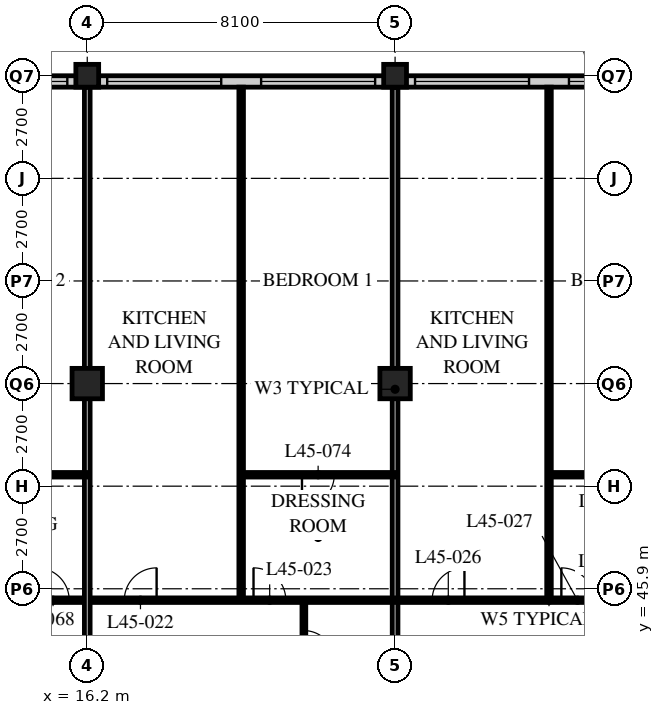
"""IFC4 building model, lengths in metres.
Left out: names, types, materials, properties, quantities, classifications, styles, units other than length and angle.
Written with IfcOpenShell. Run it as: python <this file> out.ifc"""

import sys

from ifc_helpers import new_model, si_unit, direction, frame, frame_2d, origin, origin_2d, place, context, subcontext, project, spatial, rectangle, hollow_rectangle, extrude, element, fill, save


model = new_model("IFC4")
c1 = context("Model", 3, precision=1e-05, world=origin(), true_north=direction((0.0, 1.0)))
c2 = subcontext(c1, "Body", "Model", "MODEL_VIEW")
j1 = project(units=[si_unit("LENGTHUNIT", "METRE"), si_unit("PLANEANGLEUNIT", "RADIAN")], contexts=[c1])
p1 = place(None, origin())
s1 = spatial("IfcSite", under=j1, at=p1, CompositionType="ELEMENT")
p2 = place(p1, origin())
s2 = spatial("IfcBuilding", under=s1, at=p2, CompositionType="ELEMENT")
p3 = place(p2, frame((0.0, 0.0, 177.6)))
s3 = spatial("IfcBuildingStorey", under=s2, at=p3, CompositionType="ELEMENT", Elevation=177.6)
p4 = place(p3, frame((16.2, 51.3, 0.0), z_axis=(0.0, 0.0, 1.0), x_axis=(1.0, 0.0, 0.0)))
e1 = element("IfcColumn", 1, at=p4, inside=s3, PredefinedType="COLUMN", context=c2, shape_type="SweptSolid", body=[
    extrude(hollow_rectangle(XDim=0.8, YDim=0.8, WallThickness=0.08, at=origin_2d()), origin(), (0.0, 0.0, 1.0), 3.6),
])
p5 = place(p3, frame((16.2, 59.4, 0.0), z_axis=(0.0, 0.0, 1.0), x_axis=(1.0, 0.0, 0.0)))
e2 = element("IfcColumn", 2, at=p5, inside=s3, PredefinedType="COLUMN", context=c2, shape_type="SweptSolid", body=[
    extrude(hollow_rectangle(XDim=0.6, YDim=0.6, WallThickness=0.05, at=origin_2d()), origin(), (0.0, 0.0, 1.0), 3.6),
])
p6 = place(p3, frame((24.3, 51.3, 0.0), z_axis=(0.0, 0.0, 1.0), x_axis=(1.0, 0.0, 0.0)))
e3 = element("IfcColumn", 3, at=p6, inside=s3, PredefinedType="COLUMN", context=c2, shape_type="SweptSolid", body=[
    extrude(hollow_rectangle(XDim=0.8, YDim=0.8, WallThickness=0.08, at=origin_2d()), origin(), (0.0, 0.0, 1.0), 3.6),
])
p7 = place(p3, frame((24.3, 59.4, 0.0), z_axis=(0.0, 0.0, 1.0), x_axis=(1.0, 0.0, 0.0)))
e4 = element("IfcColumn", 4, at=p7, inside=s3, PredefinedType="COLUMN", context=c2, shape_type="SweptSolid", body=[
    extrude(hollow_rectangle(XDim=0.6, YDim=0.6, WallThickness=0.05, at=origin_2d()), origin(), (0.0, 0.0, 1.0), 3.6),
])
p8 = place(p3, frame((48.3, 59.25, 0.0), z_axis=(0.0, 0.0, 1.0), x_axis=(-1.0, 0.0, 0.0)))
e5 = element("IfcWall", 5, at=p8, inside=s3, PredefinedType="SOLIDWALL", context=c2, shape_type="SweptSolid", body=[
    extrude(rectangle(XDim=40.2, YDim=0.3, at=frame_2d((20.1, 0.0))), origin(), (0.0, 0.0, 1.0), 3.39),
])
p9 = place(p8, frame((0.225, 0.0, 0.6)))
e6 = element("IfcOpeningElement", 6, at=p9, cuts=e5, PredefinedType="OPENING", context=c2, shape_type="SweptSolid", body=[
    extrude(rectangle(XDim=3.0, YDim=2.4, at=frame_2d((1.5, 1.2))), frame((0.0, 0.16, 0.0), z_axis=(0.0, -1.0, 0.0), x_axis=(1.0, 0.0, 0.0)), (0.0, 0.0, 1.0), 0.32),
])
p10 = place(p8, frame((4.275, 0.0, 0.6)))
e7 = element("IfcOpeningElement", 7, at=p10, cuts=e5, PredefinedType="OPENING", context=c2, shape_type="SweptSolid", body=[
    extrude(rectangle(XDim=3.0, YDim=2.4, at=frame_2d((1.5, 1.2))), frame((0.0, 0.16, 0.0), z_axis=(0.0, -1.0, 0.0), x_axis=(1.0, 0.0, 0.0)), (0.0, 0.0, 1.0), 0.32),
])
p11 = place(p8, frame((8.325, 0.0, 0.6)))
e8 = element("IfcOpeningElement", 8, at=p11, cuts=e5, PredefinedType="OPENING", context=c2, shape_type="SweptSolid", body=[
    extrude(rectangle(XDim=3.0, YDim=2.4, at=frame_2d((1.5, 1.2))), frame((0.0, 0.16, 0.0), z_axis=(0.0, -1.0, 0.0), x_axis=(1.0, 0.0, 0.0)), (0.0, 0.0, 1.0), 0.32),
])
p12 = place(p8, frame((12.375, 0.0, 0.6)))
e9 = element("IfcOpeningElement", 9, at=p12, cuts=e5, PredefinedType="OPENING", context=c2, shape_type="SweptSolid", body=[
    extrude(rectangle(XDim=3.0, YDim=2.4, at=frame_2d((1.5, 1.2))), frame((0.0, 0.16, 0.0), z_axis=(0.0, -1.0, 0.0), x_axis=(1.0, 0.0, 0.0)), (0.0, 0.0, 1.0), 0.32),
])
p13 = place(p8, frame((16.425, 0.0, 0.6)))
e10 = element("IfcOpeningElement", 10, at=p13, cuts=e5, PredefinedType="OPENING", context=c2, shape_type="SweptSolid", body=[
    extrude(rectangle(XDim=3.0, YDim=2.4, at=frame_2d((1.5, 1.2))), frame((0.0, 0.16, 0.0), z_axis=(0.0, -1.0, 0.0), x_axis=(1.0, 0.0, 0.0)), (0.0, 0.0, 1.0), 0.32),
])
p14 = place(p8, frame((20.475, 0.0, 0.6)))
e11 = element("IfcOpeningElement", 11, at=p14, cuts=e5, PredefinedType="OPENING", context=c2, shape_type="SweptSolid", body=[
    extrude(rectangle(XDim=3.0, YDim=2.4, at=frame_2d((1.5, 1.2))), frame((0.0, 0.16, 0.0), z_axis=(0.0, -1.0, 0.0), x_axis=(1.0, 0.0, 0.0)), (0.0, 0.0, 1.0), 0.32),
])
p15 = place(p8, frame((24.525, 0.0, 0.6)))
e12 = element("IfcOpeningElement", 12, at=p15, cuts=e5, PredefinedType="OPENING", context=c2, shape_type="SweptSolid", body=[
    extrude(rectangle(XDim=3.0, YDim=2.4, at=frame_2d((1.5, 1.2))), frame((0.0, 0.16, 0.0), z_axis=(0.0, -1.0, 0.0), x_axis=(1.0, 0.0, 0.0)), (0.0, 0.0, 1.0), 0.32),
])
p16 = place(p8, frame((28.575, 0.0, 0.6)))
e13 = element("IfcOpeningElement", 13, at=p16, cuts=e5, PredefinedType="OPENING", context=c2, shape_type="SweptSolid", body=[
    extrude(rectangle(XDim=3.0, YDim=2.4, at=frame_2d((1.5, 1.2))), frame((0.0, 0.16, 0.0), z_axis=(0.0, -1.0, 0.0), x_axis=(1.0, 0.0, 0.0)), (0.0, 0.0, 1.0), 0.32),
])
p17 = place(p8, frame((32.625, 0.0, 0.6)))
e14 = element("IfcOpeningElement", 14, at=p17, cuts=e5, PredefinedType="OPENING", context=c2, shape_type="SweptSolid", body=[
    extrude(rectangle(XDim=3.0, YDim=2.4, at=frame_2d((1.5, 1.2))), frame((0.0, 0.16, 0.0), z_axis=(0.0, -1.0, 0.0), x_axis=(1.0, 0.0, 0.0)), (0.0, 0.0, 1.0), 0.32),
])
p18 = place(p8, frame((36.675, 0.0, 0.6)))
e15 = element("IfcOpeningElement", 15, at=p18, cuts=e5, PredefinedType="OPENING", context=c2, shape_type="SweptSolid", body=[
    extrude(rectangle(XDim=3.0, YDim=2.4, at=frame_2d((1.5, 1.2))), frame((0.0, 0.16, 0.0), z_axis=(0.0, -1.0, 0.0), x_axis=(1.0, 0.0, 0.0)), (0.0, 0.0, 1.0), 0.32),
])
p19 = place(p3, frame((21.9, 43.2, 0.0), z_axis=(0.0, 0.0, 1.0), x_axis=(0.0, 1.0, 0.0)))
e16 = element("IfcWall", 16, at=p19, inside=s3, PredefinedType="PARTITIONING", context=c2, shape_type="SweptSolid", body=[
    extrude(rectangle(XDim=2.4, YDim=0.1, at=frame_2d((1.2, 0.0))), origin(), (0.0, 0.0, 1.0), 3.39),
])
p20 = place(p19, frame((0.8, 0.0, 0.0)))
e17 = element("IfcOpeningElement", 17, at=p20, cuts=e16, PredefinedType="OPENING", context=c2, shape_type="SweptSolid", body=[
    extrude(rectangle(XDim=0.8, YDim=2.1, at=frame_2d((0.4, 1.05))), frame((0.0, 0.06, 0.0), z_axis=(0.0, -1.0, 0.0), x_axis=(1.0, 0.0, 0.0)), (0.0, 0.0, 1.0), 0.12),
])
p21 = place(p3, frame((20.25, 45.6, 0.0), z_axis=(0.0, 0.0, 1.0), x_axis=(0.0, 1.0, 0.0)))
e18 = element("IfcWall", 18, at=p21, inside=s3, PredefinedType="PARTITIONING", context=c2, shape_type="SweptSolid", body=[
    extrude(rectangle(XDim=13.5, YDim=0.12, at=frame_2d((6.75, 0.0))), origin(), (0.0, 0.0, 1.0), 3.39),
])
p22 = place(p3, frame((24.3, 43.2, 0.0), z_axis=(0.0, 0.0, 1.0), x_axis=(0.0, 1.0, 0.0)))
e19 = element("IfcWall", 19, at=p22, inside=s3, PredefinedType="PARTITIONING", context=c2, shape_type="SweptSolid", body=[
    extrude(rectangle(XDim=15.9, YDim=0.15, at=frame_2d((7.95, 0.0))), origin(), (0.0, 0.0, 1.0), 2.778),
])
p23 = place(p3, frame((28.35, 45.6, 0.0), z_axis=(0.0, 0.0, 1.0), x_axis=(0.0, 1.0, 0.0)))
e20 = element("IfcWall", 20, at=p23, inside=s3, PredefinedType="PARTITIONING", context=c2, shape_type="SweptSolid", body=[
    extrude(rectangle(XDim=13.5, YDim=0.12, at=frame_2d((6.75, 0.0))), origin(), (0.0, 0.0, 1.0), 3.39),
])
p24 = place(p3, frame((8.15, 45.6, 0.0), z_axis=(0.0, 0.0, 1.0), x_axis=(1.0, 0.0, 0.0)))
e21 = element("IfcWall", 21, at=p24, inside=s3, PredefinedType="PARTITIONING", context=c2, shape_type="SweptSolid", body=[
    extrude(rectangle(XDim=40.4, YDim=0.12, at=frame_2d((20.2, 0.0))), origin(), (0.0, 0.0, 1.0), 3.39),
])
p25 = place(p24, frame((9.025, 0.0, 0.0)))
e22 = element("IfcOpeningElement", 22, at=p25, cuts=e21, PredefinedType="OPENING", context=c2, shape_type="SweptSolid", body=[
    extrude(rectangle(XDim=0.85, YDim=2.1, at=frame_2d((0.425, 1.05))), frame((0.0, 0.07, 0.0), z_axis=(0.0, -1.0, 0.0), x_axis=(1.0, 0.0, 0.0)), (0.0, 0.0, 1.0), 0.14),
])
p26 = place(p24, frame((12.425, 0.0, 0.0)))
e23 = element("IfcOpeningElement", 23, at=p26, cuts=e21, PredefinedType="OPENING", context=c2, shape_type="SweptSolid", body=[
    extrude(rectangle(XDim=0.85, YDim=2.1, at=frame_2d((0.425, 1.05))), frame((0.0, 0.07, 0.0), z_axis=(0.0, -1.0, 0.0), x_axis=(1.0, 0.0, 0.0)), (0.0, 0.0, 1.0), 0.14),
])
p27 = place(p24, frame((17.125, 0.0, 0.0)))
e24 = element("IfcOpeningElement", 24, at=p27, cuts=e21, PredefinedType="OPENING", context=c2, shape_type="SweptSolid", body=[
    extrude(rectangle(XDim=0.85, YDim=2.1, at=frame_2d((0.425, 1.05))), frame((0.0, 0.07, 0.0), z_axis=(0.0, -1.0, 0.0), x_axis=(1.0, 0.0, 0.0)), (0.0, 0.0, 1.0), 0.14),
])
p28 = place(p24, frame((20.525, 0.0, 0.0)))
e25 = element("IfcOpeningElement", 25, at=p28, cuts=e21, PredefinedType="OPENING", context=c2, shape_type="SweptSolid", body=[
    extrude(rectangle(XDim=0.85, YDim=2.1, at=frame_2d((0.425, 1.05))), frame((0.0, 0.07, 0.0), z_axis=(0.0, -1.0, 0.0), x_axis=(1.0, 0.0, 0.0)), (0.0, 0.0, 1.0), 0.14),
])
p29 = place(p24, frame((25.225, 0.0, 0.0)))
e26 = element("IfcOpeningElement", 26, at=p29, cuts=e21, PredefinedType="OPENING", context=c2, shape_type="SweptSolid", body=[
    extrude(rectangle(XDim=0.85, YDim=2.1, at=frame_2d((0.425, 1.05))), frame((0.0, 0.07, 0.0), z_axis=(0.0, -1.0, 0.0), x_axis=(1.0, 0.0, 0.0)), (0.0, 0.0, 1.0), 0.14),
])
p30 = place(p24, frame((28.625, 0.0, 0.0)))
e27 = element("IfcOpeningElement", 27, at=p30, cuts=e21, PredefinedType="OPENING", context=c2, shape_type="SweptSolid", body=[
    extrude(rectangle(XDim=0.85, YDim=2.1, at=frame_2d((0.425, 1.05))), frame((0.0, 0.07, 0.0), z_axis=(0.0, -1.0, 0.0), x_axis=(1.0, 0.0, 0.0)), (0.0, 0.0, 1.0), 0.14),
])
p31 = place(p24, frame((32.825, 0.0, 0.0)))
e28 = element("IfcOpeningElement", 28, at=p31, cuts=e21, PredefinedType="OPENING", context=c2, shape_type="SweptSolid", body=[
    extrude(rectangle(XDim=0.85, YDim=2.1, at=frame_2d((0.425, 1.05))), frame((0.0, 0.07, 0.0), z_axis=(0.0, -1.0, 0.0), x_axis=(1.0, 0.0, 0.0)), (0.0, 0.0, 1.0), 0.14),
])
p32 = place(p24, frame((36.675, 0.0, 0.0)))
e29 = element("IfcOpeningElement", 29, at=p32, cuts=e21, PredefinedType="OPENING", context=c2, shape_type="SweptSolid", body=[
    extrude(rectangle(XDim=0.85, YDim=2.1, at=frame_2d((0.425, 1.05))), frame((0.0, 0.07, 0.0), z_axis=(0.0, -1.0, 0.0), x_axis=(1.0, 0.0, 0.0)), (0.0, 0.0, 1.0), 0.14),
])
p33 = place(p24, frame((6.725, 0.0, 0.0)))
e30 = element("IfcOpeningElement", 30, at=p33, cuts=e21, PredefinedType="OPENING", context=c2, shape_type="SweptSolid", body=[
    extrude(rectangle(XDim=0.85, YDim=2.1, at=frame_2d((0.425, 1.05))), frame((0.0, 0.07, 0.0), z_axis=(0.0, -1.0, 0.0), x_axis=(1.0, 0.0, 0.0)), (0.0, 0.0, 1.0), 0.14),
])
p34 = place(p24, frame((2.875, 0.0, 0.0)))
e31 = element("IfcOpeningElement", 31, at=p34, cuts=e21, PredefinedType="OPENING", context=c2, shape_type="SweptSolid", body=[
    extrude(rectangle(XDim=0.85, YDim=2.1, at=frame_2d((0.425, 1.05))), frame((0.0, 0.07, 0.0), z_axis=(0.0, -1.0, 0.0), x_axis=(1.0, 0.0, 0.0)), (0.0, 0.0, 1.0), 0.14),
])
p35 = place(p3, frame((16.2, 43.2, 0.0), z_axis=(0.0, 0.0, 1.0), x_axis=(0.0, 1.0, 0.0)))
e32 = element("IfcWall", 32, at=p35, inside=s3, PredefinedType="PARTITIONING", context=c2, shape_type="SweptSolid", body=[
    extrude(rectangle(XDim=15.9, YDim=0.15, at=frame_2d((7.95, 0.0))), origin(), (0.0, 0.0, 1.0), 2.778),
])
p36 = place(p3, frame((20.25, 48.9, 0.0), z_axis=(0.0, 0.0, 1.0), x_axis=(1.0, 0.0, 0.0)))
e33 = element("IfcWall", 33, at=p36, inside=s3, PredefinedType="PARTITIONING", context=c2, shape_type="SweptSolid", body=[
    extrude(rectangle(XDim=4.05, YDim=0.12, at=frame_2d((2.025, 0.0))), origin(), (0.0, 0.0, 1.0), 3.39),
])
p37 = place(p36, frame((1.6, 0.0, 0.0)))
e34 = element("IfcOpeningElement", 34, at=p37, cuts=e33, PredefinedType="OPENING", context=c2, shape_type="SweptSolid", body=[
    extrude(rectangle(XDim=0.85, YDim=2.1, at=frame_2d((0.425, 1.05))), frame((0.0, 0.07, 0.0), z_axis=(0.0, -1.0, 0.0), x_axis=(1.0, 0.0, 0.0)), (0.0, 0.0, 1.0), 0.14),
])
p38 = place(p3, frame((28.35, 48.9, 0.0), z_axis=(0.0, 0.0, 1.0), x_axis=(1.0, 0.0, 0.0)))
e35 = element("IfcWall", 35, at=p38, inside=s3, PredefinedType="PARTITIONING", context=c2, shape_type="SweptSolid", body=[
    extrude(rectangle(XDim=4.05, YDim=0.12, at=frame_2d((2.025, 0.0))), origin(), (0.0, 0.0, 1.0), 3.39),
])
p39 = place(p38, frame((1.6, 0.0, 0.0)))
e36 = element("IfcOpeningElement", 36, at=p39, cuts=e35, PredefinedType="OPENING", context=c2, shape_type="SweptSolid", body=[
    extrude(rectangle(XDim=0.85, YDim=2.1, at=frame_2d((0.425, 1.05))), frame((0.0, 0.07, 0.0), z_axis=(0.0, -1.0, 0.0), x_axis=(1.0, 0.0, 0.0)), (0.0, 0.0, 1.0), 0.14),
])
p40 = place(p3, frame((12.15, 48.9, 0.0), z_axis=(0.0, 0.0, 1.0), x_axis=(1.0, 0.0, 0.0)))
e37 = element("IfcWall", 37, at=p40, inside=s3, PredefinedType="PARTITIONING", context=c2, shape_type="SweptSolid", body=[
    extrude(rectangle(XDim=4.05, YDim=0.12, at=frame_2d((2.025, 0.0))), origin(), (0.0, 0.0, 1.0), 3.39),
])
p41 = place(p40, frame((1.6, 0.0, 0.0)))
e38 = element("IfcOpeningElement", 38, at=p41, cuts=e37, PredefinedType="OPENING", context=c2, shape_type="SweptSolid", body=[
    extrude(rectangle(XDim=0.85, YDim=2.1, at=frame_2d((0.425, 1.05))), frame((0.0, 0.07, 0.0), z_axis=(0.0, -1.0, 0.0), x_axis=(1.0, 0.0, 0.0)), (0.0, 0.0, 1.0), 0.14),
])
p42 = place(p13, origin())
e39 = element("IfcWindow", 39, at=p42, inside=s3, PartitioningType="SINGLE_PANEL", PredefinedType="WINDOW", context=c2, shape_type="SweptSolid", body=[
    extrude(rectangle(XDim=3.0, YDim=2.4, at=frame_2d((1.5, 1.2))), frame((0.0, 0.03, 0.0), z_axis=(0.0, -1.0, 0.0), x_axis=(1.0, 0.0, 0.0)), (0.0, 0.0, 1.0), 0.06),
])
fill(e10, e39)
p43 = place(p14, origin())
e40 = element("IfcWindow", 40, at=p43, inside=s3, PartitioningType="SINGLE_PANEL", PredefinedType="WINDOW", context=c2, shape_type="SweptSolid", body=[
    extrude(rectangle(XDim=3.0, YDim=2.4, at=frame_2d((1.5, 1.2))), frame((0.0, 0.03, 0.0), z_axis=(0.0, -1.0, 0.0), x_axis=(1.0, 0.0, 0.0)), (0.0, 0.0, 1.0), 0.06),
])
fill(e11, e40)
p44 = place(p15, origin())
e41 = element("IfcWindow", 41, at=p44, inside=s3, PartitioningType="SINGLE_PANEL", PredefinedType="WINDOW", context=c2, shape_type="SweptSolid", body=[
    extrude(rectangle(XDim=3.0, YDim=2.4, at=frame_2d((1.5, 1.2))), frame((0.0, 0.03, 0.0), z_axis=(0.0, -1.0, 0.0), x_axis=(1.0, 0.0, 0.0)), (0.0, 0.0, 1.0), 0.06),
])
fill(e12, e41)
p45 = place(p16, origin())
e42 = element("IfcWindow", 42, at=p45, inside=s3, PartitioningType="SINGLE_PANEL", PredefinedType="WINDOW", context=c2, shape_type="SweptSolid", body=[
    extrude(rectangle(XDim=3.0, YDim=2.4, at=frame_2d((1.5, 1.2))), frame((0.0, 0.03, 0.0), z_axis=(0.0, -1.0, 0.0), x_axis=(1.0, 0.0, 0.0)), (0.0, 0.0, 1.0), 0.06),
])
fill(e13, e42)
p46 = place(p17, origin())
e43 = element("IfcWindow", 43, at=p46, inside=s3, PartitioningType="SINGLE_PANEL", PredefinedType="WINDOW", context=c2, shape_type="SweptSolid", body=[
    extrude(rectangle(XDim=3.0, YDim=2.4, at=frame_2d((1.5, 1.2))), frame((0.0, 0.03, 0.0), z_axis=(0.0, -1.0, 0.0), x_axis=(1.0, 0.0, 0.0)), (0.0, 0.0, 1.0), 0.06),
])
fill(e14, e43)
p47 = place(p20, origin())
e44 = element("IfcDoor", 44, at=p47, inside=s3, OperationType="SINGLE_SWING_RIGHT", PredefinedType="DOOR", context=c2, shape_type="SweptSolid", body=[
    extrude(rectangle(XDim=0.8, YDim=2.1, at=frame_2d((0.4, 1.05))), frame((0.0, 0.025, 0.0), z_axis=(0.0, -1.0, 0.0), x_axis=(1.0, 0.0, 0.0)), (0.0, 0.0, 1.0), 0.05),
])
fill(e17, e44)
p48 = place(p25, origin())
e45 = element("IfcDoor", 45, at=p48, inside=s3, OperationType="SINGLE_SWING_RIGHT", PredefinedType="DOOR", context=c2, shape_type="SweptSolid", body=[
    extrude(rectangle(XDim=0.85, YDim=2.1, at=frame_2d((0.425, 1.05))), frame((0.0, 0.025, 0.0), z_axis=(0.0, -1.0, 0.0), x_axis=(1.0, 0.0, 0.0)), (0.0, 0.0, 1.0), 0.05),
])
fill(e22, e45)
p49 = place(p26, origin())
e46 = element("IfcDoor", 46, at=p49, inside=s3, OperationType="SINGLE_SWING_LEFT", PredefinedType="DOOR", context=c2, shape_type="SweptSolid", body=[
    extrude(rectangle(XDim=0.85, YDim=2.1, at=frame_2d((0.425, 1.05))), frame((0.0, 0.025, 0.0), z_axis=(0.0, -1.0, 0.0), x_axis=(1.0, 0.0, 0.0)), (0.0, 0.0, 1.0), 0.05),
])
fill(e23, e46)
p50 = place(p27, origin())
e47 = element("IfcDoor", 47, at=p50, inside=s3, OperationType="SINGLE_SWING_RIGHT", PredefinedType="DOOR", context=c2, shape_type="SweptSolid", body=[
    extrude(rectangle(XDim=0.85, YDim=2.1, at=frame_2d((0.425, 1.05))), frame((0.0, 0.025, 0.0), z_axis=(0.0, -1.0, 0.0), x_axis=(1.0, 0.0, 0.0)), (0.0, 0.0, 1.0), 0.05),
])
fill(e24, e47)
p51 = place(p28, origin())
e48 = element("IfcDoor", 48, at=p51, inside=s3, OperationType="SINGLE_SWING_LEFT", PredefinedType="DOOR", context=c2, shape_type="SweptSolid", body=[
    extrude(rectangle(XDim=0.85, YDim=2.1, at=frame_2d((0.425, 1.05))), frame((0.0, 0.025, 0.0), z_axis=(0.0, -1.0, 0.0), x_axis=(1.0, 0.0, 0.0)), (0.0, 0.0, 1.0), 0.05),
])
fill(e25, e48)
p52 = place(p33, origin())
e49 = element("IfcDoor", 49, at=p52, inside=s3, OperationType="SINGLE_SWING_LEFT", PredefinedType="DOOR", context=c2, shape_type="SweptSolid", body=[
    extrude(rectangle(XDim=0.85, YDim=2.1, at=frame_2d((0.425, 1.05))), frame((0.0, 0.025, 0.0), z_axis=(0.0, -1.0, 0.0), x_axis=(1.0, 0.0, 0.0)), (0.0, 0.0, 1.0), 0.05),
])
fill(e30, e49)
p53 = place(p37, origin())
e50 = element("IfcDoor", 50, at=p53, inside=s3, OperationType="SINGLE_SWING_RIGHT", PredefinedType="DOOR", context=c2, shape_type="SweptSolid", body=[
    extrude(rectangle(XDim=0.85, YDim=2.1, at=frame_2d((0.425, 1.05))), frame((0.0, 0.025, 0.0), z_axis=(0.0, -1.0, 0.0), x_axis=(1.0, 0.0, 0.0)), (0.0, 0.0, 1.0), 0.05),
])
fill(e34, e50)
save(model, sys.argv[1])
